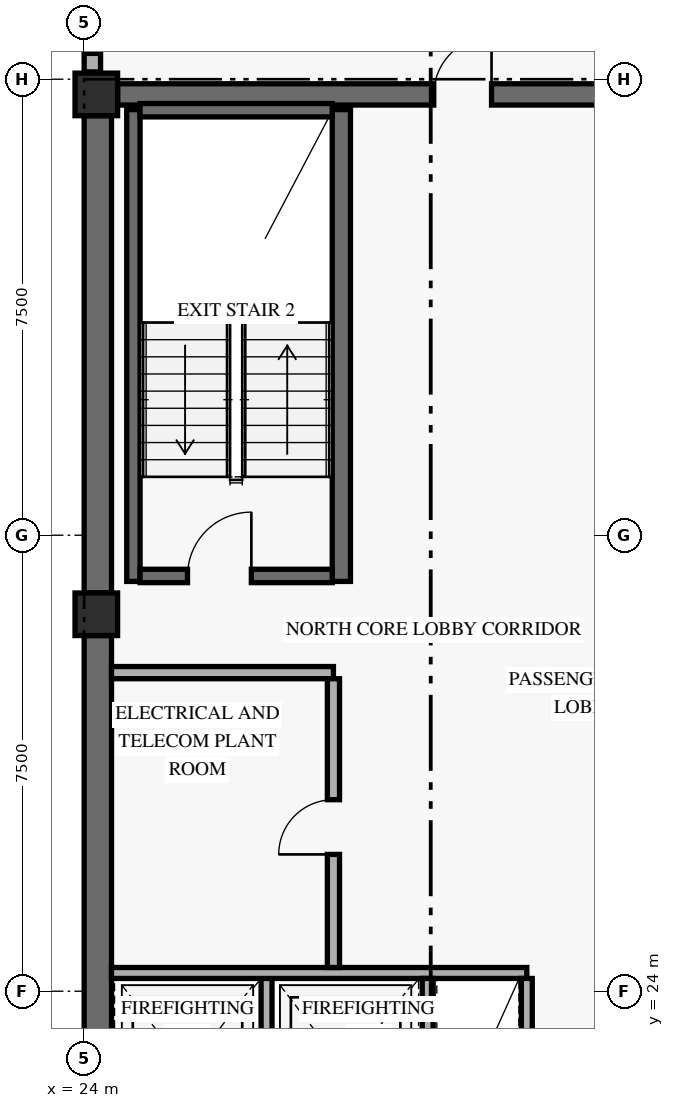
"""IFC4 building model, lengths in metres.
Left out: names, types, materials, properties, quantities, classifications, styles, units other than length and angle.
Written with IfcOpenShell. Run it as: python <this file> out.ifc"""

import sys

from ifc_helpers import new_model, si_unit, direction, frame, frame_2d, origin, origin_2d, place, context, subcontext, project, spatial, rectangle, extrude, element, fill, save


model = new_model("IFC4")
c1 = context("Model", 3, precision=1e-05, world=origin(), true_north=direction((0.0, 1.0)))
c2 = subcontext(c1, "Body", "Model", "MODEL_VIEW")
j1 = project(units=[si_unit("LENGTHUNIT", "METRE"), si_unit("PLANEANGLEUNIT", "RADIAN")], contexts=[c1])
p1 = place(None, origin())
s1 = spatial("IfcSite", under=j1, at=p1, CompositionType="ELEMENT")
p2 = place(p1, origin())
s2 = spatial("IfcBuilding", under=s1, at=p2, CompositionType="ELEMENT")
p3 = place(p2, frame((0.0, 0.0, 260.4)))
s3 = spatial("IfcBuildingStorey", under=s2, at=p3, CompositionType="ELEMENT", Elevation=260.4)
p4 = place(p3, frame((24.225, 17.9, 0.0), z_axis=(0.0, 0.0, 1.0), x_axis=(0.0, 1.0, 0.0)))
e1 = element("IfcWall", 1, at=p4, inside=s3, PredefinedType="SHEAR", context=c2, shape_type="SweptSolid", body=[
    extrude(rectangle(XDim=11.95, YDim=0.45, at=frame_2d((5.975, 0.0))), origin(), (0.0, 0.0, 1.0), 2.821),
])
p5 = place(p3, frame((24.225, 30.55, 0.0), z_axis=(0.0, 0.0, 1.0), x_axis=(0.0, 1.0, 0.0)))
e2 = element("IfcWall", 2, at=p5, inside=s3, PredefinedType="SHEAR", context=c2, shape_type="SweptSolid", body=[
    extrude(rectangle(XDim=7.85, YDim=0.45, at=frame_2d((3.925, 0.0))), origin(), (0.0, 0.0, 1.0), 2.821),
])
p6 = place(p3, frame((24.55, 38.75, 0.0), z_axis=(0.0, 0.0, 1.0), x_axis=(1.0, 0.0, 0.0)))
e3 = element("IfcWall", 3, at=p6, inside=s3, PredefinedType="SHEAR", context=c2, shape_type="SweptSolid", body=[
    extrude(rectangle(XDim=10.3, YDim=0.35, at=frame_2d((5.15, 0.0))), origin(), (0.0, 0.0, 1.0), 3.36),
])
p7 = place(p6, frame((5.2, 0.0, 0.0)))
e4 = element("IfcOpeningElement", 4, at=p7, cuts=e3, PredefinedType="OPENING", context=c2, shape_type="SweptSolid", body=[
    extrude(rectangle(XDim=0.95, YDim=2.15, at=frame_2d((0.475, 1.075))), frame((0.0, 0.185, 0.0), z_axis=(0.0, -1.0, 0.0), x_axis=(1.0, 0.0, 0.0)), (0.0, 0.0, 1.0), 0.37),
])
p8 = place(p3, frame((24.81, 30.74, 0.0), z_axis=(0.0, 0.0, 1.0), x_axis=(0.0, 1.0, 0.0)))
e5 = element("IfcWall", 5, at=p8, inside=s3, PredefinedType="SHEAR", context=c2, shape_type="SweptSolid", body=[
    extrude(rectangle(XDim=7.76, YDim=0.22, at=frame_2d((3.88, 0.0))), origin(), (0.0, 0.0, 1.0), 3.36),
])
p9 = place(p3, frame((28.23, 30.74, 0.0), z_axis=(0.0, 0.0, 1.0), x_axis=(0.0, 1.0, 0.0)))
e6 = element("IfcWall", 6, at=p9, inside=s3, PredefinedType="SHEAR", context=c2, shape_type="SweptSolid", body=[
    extrude(rectangle(XDim=7.76, YDim=0.3, at=frame_2d((3.88, 0.0))), origin(), (0.0, 0.0, 1.0), 3.36),
])
p10 = place(p3, frame((24.92, 30.83, 0.0), z_axis=(0.0, 0.0, 1.0), x_axis=(1.0, 0.0, 0.0)))
e7 = element("IfcWall", 7, at=p10, inside=s3, PredefinedType="SHEAR", context=c2, shape_type="SweptSolid", body=[
    extrude(rectangle(XDim=3.16, YDim=0.22, at=frame_2d((1.58, 0.0))), origin(), (0.0, 0.0, 1.0), 3.36),
])
p11 = place(p10, frame((0.78, 0.0, 0.0)))
e8 = element("IfcOpeningElement", 8, at=p11, cuts=e7, PredefinedType="OPENING", context=c2, shape_type="SweptSolid", body=[
    extrude(rectangle(XDim=1.05, YDim=2.15, at=frame_2d((0.525, 1.075))), frame((0.0, 0.12, 0.0), z_axis=(0.0, -1.0, 0.0), x_axis=(1.0, 0.0, 0.0)), (0.0, 0.0, 1.0), 0.24),
])
p12 = place(p3, frame((24.92, 38.49, 0.0), z_axis=(0.0, 0.0, 1.0), x_axis=(1.0, 0.0, 0.0)))
e9 = element("IfcWall", 9, at=p12, inside=s3, PredefinedType="SHEAR", context=c2, shape_type="SweptSolid", body=[
    extrude(rectangle(XDim=3.16, YDim=0.22, at=frame_2d((1.58, 0.0))), origin(), (0.0, 0.0, 1.0), 3.36),
])
for number, where, z_axis, x_axis in (
    (10, (24.2, 30.2, 0.0), (0.0, 0.0, 1.0), (1.0, 0.0, 0.0)),
    (11, (24.2, 38.75, 0.0), (0.0, 0.0, 1.0), (1.0, 0.0, 0.0)),
):
    element("IfcColumn", number, at=place(p3, frame(where, z_axis=z_axis, x_axis=x_axis)), inside=s3, PredefinedType="COLUMN", context=c2, shape_type="SweptSolid", body=[
        extrude(rectangle(XDim=0.7, YDim=0.7, at=origin_2d()), origin(), (0.0, 0.0, 1.0), 3.6),
    ])
p13 = place(p3, frame((24.135, 39.12, 0.0), z_axis=(0.0, 0.0, 1.0), x_axis=(0.0, 1.0, 0.0)))
e12 = element("IfcWall", 12, at=p13, inside=s3, PredefinedType="SOLIDWALL", context=c2, shape_type="SweptSolid", body=[
    extrude(rectangle(XDim=1.56, YDim=0.27, at=frame_2d((0.78, 0.0))), origin(), (0.0, 0.0, 1.0), 2.803),
])
p14 = place(p13, frame((0.305, 0.0, 0.85)))
e13 = element("IfcOpeningElement", 13, at=p14, cuts=e12, PredefinedType="OPENING", context=c2, shape_type="SweptSolid", body=[
    extrude(rectangle(XDim=0.95, YDim=1.5, at=frame_2d((0.475, 0.75))), frame((0.0, 0.145, 0.0), z_axis=(0.0, -1.0, 0.0), x_axis=(1.0, 0.0, 0.0)), (0.0, 0.0, 1.0), 0.29),
])
p15 = place(p3, frame((27.0, 21.19, 0.0), z_axis=(0.0, 0.0, 1.0), x_axis=(0.0, 1.0, 0.0)))
e14 = element("IfcWall", 14, at=p15, inside=s3, PredefinedType="STANDARD", context=c2, shape_type="SweptSolid", body=[
    extrude(rectangle(XDim=3.11, YDim=0.18, at=frame_2d((1.555, 0.0))), origin(), (0.0, 0.0, 1.0), 3.36),
])
p16 = place(p3, frame((24.45, 24.3, 0.0), z_axis=(0.0, 0.0, 1.0), x_axis=(1.0, 0.0, 0.0)))
e15 = element("IfcWall", 15, at=p16, inside=s3, PredefinedType="STANDARD", context=c2, shape_type="SweptSolid", body=[
    extrude(rectangle(XDim=6.83, YDim=0.18, at=frame_2d((3.415, 0.0))), origin(), (0.0, 0.0, 1.0), 3.36),
])
for number, where, z_axis, x_axis in (
    (16, (29.65, 21.19, 0.0), (0.0, 0.0, 1.0), (0.0, 1.0, 0.0)),
    (17, (31.28, 21.19, 0.0), (0.0, 0.0, 1.0), (0.0, 1.0, 0.0)),
):
    element("IfcWall", number, at=place(p3, frame(where, z_axis=z_axis, x_axis=x_axis)), inside=s3, PredefinedType="STANDARD", context=c2, shape_type="SweptSolid", body=[
        extrude(rectangle(XDim=3.02, YDim=0.18, at=frame_2d((1.51, 0.0))), origin(), (0.0, 0.0, 1.0), 3.36),
    ])
p17 = place(p3, frame((24.45, 29.24, 0.0), z_axis=(0.0, 0.0, 1.0), x_axis=(1.0, 0.0, 0.0)))
e18 = element("IfcWall", 18, at=p17, inside=s3, PredefinedType="STANDARD", context=c2, shape_type="SweptSolid", body=[
    extrude(rectangle(XDim=3.65, YDim=0.2, at=frame_2d((1.825, 0.0))), origin(), (0.0, 0.0, 1.0), 3.36),
])
p18 = place(p3, frame((28.1, 24.39, 0.0), z_axis=(0.0, 0.0, 1.0), x_axis=(0.0, 1.0, 0.0)))
e19 = element("IfcWall", 19, at=p18, inside=s3, PredefinedType="STANDARD", context=c2, shape_type="SweptSolid", body=[
    extrude(rectangle(XDim=4.75, YDim=0.2, at=frame_2d((2.375, 0.0))), origin(), (0.0, 0.0, 1.0), 3.36),
])
p19 = place(p18, frame((1.86, 0.0, 0.0)))
e20 = element("IfcOpeningElement", 20, at=p19, cuts=e19, PredefinedType="OPENING", context=c2, shape_type="SweptSolid", body=[
    extrude(rectangle(XDim=0.9, YDim=2.1, at=frame_2d((0.45, 1.05))), frame((0.0, 0.11, 0.0), z_axis=(0.0, -1.0, 0.0), x_axis=(1.0, 0.0, 0.0)), (0.0, 0.0, 1.0), 0.22),
])
p20 = place(p14, origin())
e21 = element("IfcWindow", 21, at=p20, inside=s3, PartitioningType="SINGLE_PANEL", PredefinedType="WINDOW", context=c2, shape_type="SweptSolid", body=[
    extrude(rectangle(XDim=0.95, YDim=1.5, at=frame_2d((0.475, 0.75))), frame((0.0, 0.03, 0.0), z_axis=(0.0, -1.0, 0.0), x_axis=(1.0, 0.0, 0.0)), (0.0, 0.0, 1.0), 0.06),
])
fill(e13, e21)
p21 = place(p11, origin())
e22 = element("IfcDoor", 22, at=p21, inside=s3, OperationType="SINGLE_SWING_RIGHT", PredefinedType="DOOR", context=c2, shape_type="SweptSolid", body=[
    extrude(rectangle(XDim=1.05, YDim=2.15, at=frame_2d((0.525, 1.075))), frame((0.0, 0.025, 0.0), z_axis=(0.0, -1.0, 0.0), x_axis=(1.0, 0.0, 0.0)), (0.0, 0.0, 1.0), 0.05),
])
fill(e8, e22)
p22 = place(p19, origin())
e23 = element("IfcDoor", 23, at=p22, inside=s3, OperationType="SINGLE_SWING_LEFT", PredefinedType="DOOR", context=c2, shape_type="SweptSolid", body=[
    extrude(rectangle(XDim=0.9, YDim=2.1, at=frame_2d((0.45, 1.05))), frame((0.0, 0.025, 0.0), z_axis=(0.0, -1.0, 0.0), x_axis=(1.0, 0.0, 0.0)), (0.0, 0.0, 1.0), 0.05),
])
fill(e20, e23)
p23 = place(p7, origin())
e24 = element("IfcDoor", 24, at=p23, inside=s3, OperationType="SINGLE_SWING_RIGHT", PredefinedType="DOOR", context=c2, shape_type="SweptSolid", body=[
    extrude(rectangle(XDim=0.95, YDim=2.15, at=frame_2d((0.475, 1.075))), frame((0.0, 0.025, 0.0), z_axis=(0.0, -1.0, 0.0), x_axis=(1.0, 0.0, 0.0)), (0.0, 0.0, 1.0), 0.05),
])
fill(e4, e24)
save(model, sys.argv[1])
